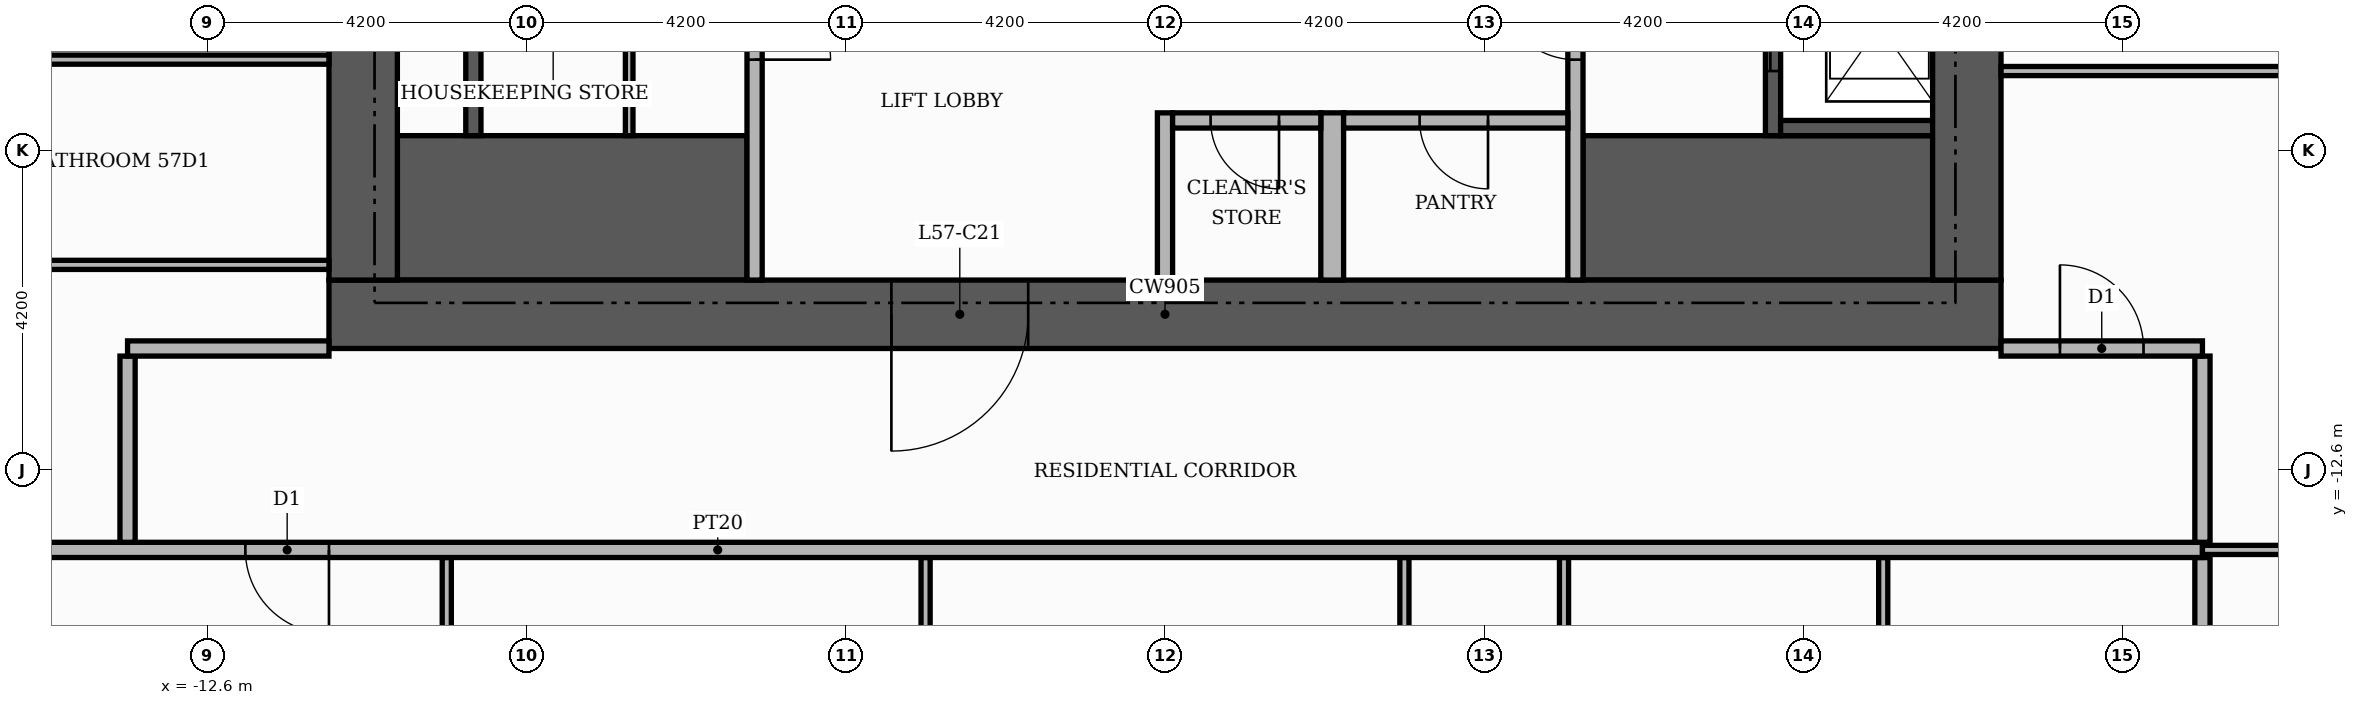
"""IFC4 building model, lengths in metres.
Left out: names, types, materials, properties, quantities, classifications, styles, units other than length and angle.
Written with IfcOpenShell. Run it as: python <this file> out.ifc"""

import sys

from ifc_helpers import new_model, si_unit, direction, frame, frame_2d, origin, place, context, subcontext, project, spatial, rectangle, extrude, element, fill, save


model = new_model("IFC4")
c1 = context("Model", 3, precision=1e-05, world=origin(), true_north=direction((0.0, 1.0)))
c2 = subcontext(c1, "Body", "Model", "MODEL_VIEW")
j1 = project(units=[si_unit("LENGTHUNIT", "METRE"), si_unit("PLANEANGLEUNIT", "RADIAN")], contexts=[c1])
p1 = place(None, origin())
s1 = spatial("IfcSite", under=j1, at=p1, CompositionType="ELEMENT")
p2 = place(p1, origin())
s2 = spatial("IfcBuilding", under=s1, at=p2, CompositionType="ELEMENT")
p3 = place(p2, frame((0.0, 0.0, 240.6)))
s3 = spatial("IfcBuildingStorey", under=s2, at=p3, CompositionType="ELEMENT", Elevation=240.6)
for number, where, z_axis, x_axis in (
    (1, (-10.1, -9.15, 0.0), (0.0, 0.0, 1.0), (1.0, 0.0, 0.0)),
    (2, (5.5, -9.15, 0.0), (0.0, 0.0, 1.0), (1.0, 0.0, 0.0)),
):
    element("IfcWall", number, at=place(p3, frame(where, z_axis=z_axis, x_axis=x_axis)), inside=s3, PredefinedType="SHEAR", context=c2, shape_type="SweptSolid", body=[
        extrude(rectangle(XDim=4.6, YDim=1.9, at=frame_2d((2.3, 0.0))), origin(), (0.0, 0.0, 1.0), 3.48),
    ])
p4 = place(p3, frame((-9.1, -8.2, 0.0), z_axis=(0.0, 0.0, 1.0), x_axis=(0.0, 1.0, 0.0)))
e3 = element("IfcWall", 3, at=p4, inside=s3, PredefinedType="SHEAR", context=c2, shape_type="SweptSolid", body=[
    extrude(rectangle(XDim=16.4, YDim=0.2, at=frame_2d((8.2, 0.0))), origin(), (0.0, 0.0, 1.0), 3.48),
])
p5 = place(p3, frame((8.0, -8.2, 0.0), z_axis=(0.0, 0.0, 1.0), x_axis=(0.0, 1.0, 0.0)))
e4 = element("IfcWall", 4, at=p5, inside=s3, PredefinedType="SHEAR", context=c2, shape_type="SweptSolid", body=[
    extrude(rectangle(XDim=16.4, YDim=0.2, at=frame_2d((8.2, 0.0))), origin(), (0.0, 0.0, 1.0), 3.48),
])
p6 = place(p5, frame((0.85, 0.0, 0.0)))
e5 = element("IfcOpeningElement", 5, at=p6, cuts=e4, PredefinedType="OPENING", context=c2, shape_type="SweptSolid", body=[
    extrude(rectangle(XDim=1.2, YDim=2.1, at=frame_2d((0.6, 1.05))), frame((0.0, 0.11, 0.0), z_axis=(0.0, -1.0, 0.0), x_axis=(1.0, 0.0, 0.0)), (0.0, 0.0, 1.0), 0.22),
])
p7 = place(p5, frame((3.55, 0.0, 0.0)))
e6 = element("IfcOpeningElement", 6, at=p7, cuts=e4, PredefinedType="OPENING", context=c2, shape_type="SweptSolid", body=[
    extrude(rectangle(XDim=1.2, YDim=2.1, at=frame_2d((0.6, 1.05))), frame((0.0, 0.11, 0.0), z_axis=(0.0, -1.0, 0.0), x_axis=(1.0, 0.0, 0.0)), (0.0, 0.0, 1.0), 0.22),
])
p8 = place(p5, frame((6.25, 0.0, 0.0)))
e7 = element("IfcOpeningElement", 7, at=p8, cuts=e4, PredefinedType="OPENING", context=c2, shape_type="SweptSolid", body=[
    extrude(rectangle(XDim=1.2, YDim=2.1, at=frame_2d((0.6, 1.05))), frame((0.0, 0.11, 0.0), z_axis=(0.0, -1.0, 0.0), x_axis=(1.0, 0.0, 0.0)), (0.0, 0.0, 1.0), 0.22),
])
p9 = place(p5, frame((8.95, 0.0, 0.0)))
e8 = element("IfcOpeningElement", 8, at=p9, cuts=e4, PredefinedType="OPENING", context=c2, shape_type="SweptSolid", body=[
    extrude(rectangle(XDim=1.2, YDim=2.1, at=frame_2d((0.6, 1.05))), frame((0.0, 0.11, 0.0), z_axis=(0.0, -1.0, 0.0), x_axis=(1.0, 0.0, 0.0)), (0.0, 0.0, 1.0), 0.22),
])
p10 = place(p5, frame((11.65, 0.0, 0.0)))
e9 = element("IfcOpeningElement", 9, at=p10, cuts=e4, PredefinedType="OPENING", context=c2, shape_type="SweptSolid", body=[
    extrude(rectangle(XDim=1.2, YDim=2.1, at=frame_2d((0.6, 1.05))), frame((0.0, 0.11, 0.0), z_axis=(0.0, -1.0, 0.0), x_axis=(1.0, 0.0, 0.0)), (0.0, 0.0, 1.0), 0.22),
])
p11 = place(p5, frame((14.35, 0.0, 0.0)))
e10 = element("IfcOpeningElement", 10, at=p11, cuts=e4, PredefinedType="OPENING", context=c2, shape_type="SweptSolid", body=[
    extrude(rectangle(XDim=1.2, YDim=2.1, at=frame_2d((0.6, 1.05))), frame((0.0, 0.11, 0.0), z_axis=(0.0, -1.0, 0.0), x_axis=(1.0, 0.0, 0.0)), (0.0, 0.0, 1.0), 0.22),
])
p12 = place(p3, frame((8.1, -8.1, 0.0), z_axis=(0.0, 0.0, 1.0), x_axis=(1.0, 0.0, 0.0)))
e11 = element("IfcWall", 11, at=p12, inside=s3, PredefinedType="SHEAR", context=c2, shape_type="SweptSolid", body=[
    extrude(rectangle(XDim=2.0, YDim=0.2, at=frame_2d((1.0, 0.0))), origin(), (0.0, 0.0, 1.0), 3.48),
])
p13 = place(p3, frame((-11.0, -10.55, 0.0), z_axis=(0.0, 0.0, 1.0), x_axis=(1.0, 0.0, 0.0)))
e12 = element("IfcWall", 12, at=p13, inside=s3, PredefinedType="SHEAR", context=c2, shape_type="SweptSolid", body=[
    extrude(rectangle(XDim=22.0, YDim=0.9, at=frame_2d((11.0, 0.0))), origin(), (0.0, 0.0, 1.0), 3.48),
])
p14 = place(p13, frame((7.4, 0.0, 0.0)))
e13 = element("IfcOpeningElement", 13, at=p14, cuts=e12, PredefinedType="OPENING", context=c2, shape_type="SweptSolid", body=[
    extrude(rectangle(XDim=1.8, YDim=2.2, at=frame_2d((0.9, 1.1))), frame((0.0, 0.46, 0.0), z_axis=(0.0, -1.0, 0.0), x_axis=(1.0, 0.0, 0.0)), (0.0, 0.0, 1.0), 0.92),
])
for number, where, z_axis, x_axis in (
    (14, (-10.55, -10.1, 0.0), (0.0, 0.0, 1.0), (0.0, 1.0, 0.0)),
    (15, (10.55, -10.1, 0.0), (0.0, 0.0, 1.0), (0.0, 1.0, 0.0)),
):
    element("IfcWall", number, at=place(p3, frame(where, z_axis=z_axis, x_axis=x_axis)), inside=s3, PredefinedType="SHEAR", context=c2, shape_type="SweptSolid", body=[
        extrude(rectangle(XDim=20.2, YDim=0.9, at=frame_2d((10.1, 0.0))), origin(), (0.0, 0.0, 1.0), 3.48),
    ])
p15 = place(p3, frame((-5.4, -10.1, 0.0), z_axis=(0.0, 0.0, 1.0), x_axis=(0.0, 1.0, 0.0)))
e16 = element("IfcWall", 16, at=p15, inside=s3, PredefinedType="PARTITIONING", context=c2, shape_type="SweptSolid", body=[
    extrude(rectangle(XDim=4.6, YDim=0.2, at=frame_2d((2.3, 0.0))), origin(), (0.0, 0.0, 1.0), 3.48),
])
p16 = place(p15, frame((2.9, 0.0, 0.0)))
e17 = element("IfcOpeningElement", 17, at=p16, cuts=e16, PredefinedType="OPENING", context=c2, shape_type="SweptSolid", body=[
    extrude(rectangle(XDim=1.0, YDim=2.1, at=frame_2d((0.5, 1.05))), frame((0.0, 0.11, 0.0), z_axis=(0.0, -1.0, 0.0), x_axis=(1.0, 0.0, 0.0)), (0.0, 0.0, 1.0), 0.22),
])
p17 = place(p3, frame((0.0, -10.1, 0.0), z_axis=(0.0, 0.0, 1.0), x_axis=(0.0, 1.0, 0.0)))
e18 = element("IfcWall", 18, at=p17, inside=s3, PredefinedType="PARTITIONING", context=c2, shape_type="SweptSolid", body=[
    extrude(rectangle(XDim=2.2, YDim=0.2, at=frame_2d((1.1, 0.0))), origin(), (0.0, 0.0, 1.0), 3.48),
])
p18 = place(p3, frame((2.2, -10.1, 0.0), z_axis=(0.0, 0.0, 1.0), x_axis=(0.0, 1.0, 0.0)))
e19 = element("IfcWall", 19, at=p18, inside=s3, PredefinedType="PARTITIONING", context=c2, shape_type="SweptSolid", body=[
    extrude(rectangle(XDim=2.2, YDim=0.3, at=frame_2d((1.1, 0.0))), origin(), (0.0, 0.0, 1.0), 3.48),
])
p19 = place(p3, frame((5.4, -10.1, 0.0), z_axis=(0.0, 0.0, 1.0), x_axis=(0.0, 1.0, 0.0)))
e20 = element("IfcWall", 20, at=p19, inside=s3, PredefinedType="PARTITIONING", context=c2, shape_type="SweptSolid", body=[
    extrude(rectangle(XDim=4.6, YDim=0.2, at=frame_2d((2.3, 0.0))), origin(), (0.0, 0.0, 1.0), 3.48),
])
p20 = place(p19, frame((2.9, 0.0, 0.0)))
e21 = element("IfcOpeningElement", 21, at=p20, cuts=e20, PredefinedType="OPENING", context=c2, shape_type="SweptSolid", body=[
    extrude(rectangle(XDim=1.0, YDim=2.1, at=frame_2d((0.5, 1.05))), frame((0.0, 0.11, 0.0), z_axis=(0.0, -1.0, 0.0), x_axis=(1.0, 0.0, 0.0)), (0.0, 0.0, 1.0), 0.22),
])
p21 = place(p3, frame((-7.05, -8.2, 0.0), z_axis=(0.0, 0.0, 1.0), x_axis=(0.0, 1.0, 0.0)))
e22 = element("IfcWall", 22, at=p21, inside=s3, PredefinedType="PARTITIONING", context=c2, shape_type="SweptSolid", body=[
    extrude(rectangle(XDim=16.4, YDim=0.1, at=frame_2d((8.2, 0.0))), origin(), (0.0, 0.0, 1.0), 3.48),
])
p22 = place(p21, frame((1.15, 0.0, 0.0)))
e23 = element("IfcOpeningElement", 23, at=p22, cuts=e22, PredefinedType="OPENING", context=c2, shape_type="SweptSolid", body=[
    extrude(rectangle(XDim=0.9, YDim=2.1, at=frame_2d((0.45, 1.05))), frame((0.0, 0.06, 0.0), z_axis=(0.0, -1.0, 0.0), x_axis=(1.0, 0.0, 0.0)), (0.0, 0.0, 1.0), 0.12),
])
p23 = place(p21, frame((4.3, 0.0, 0.0)))
e24 = element("IfcOpeningElement", 24, at=p23, cuts=e22, PredefinedType="OPENING", context=c2, shape_type="SweptSolid", body=[
    extrude(rectangle(XDim=1.0, YDim=2.1, at=frame_2d((0.5, 1.05))), frame((0.0, 0.06, 0.0), z_axis=(0.0, -1.0, 0.0), x_axis=(1.0, 0.0, 0.0)), (0.0, 0.0, 1.0), 0.12),
])
p24 = place(p21, frame((7.65, 0.0, 0.0)))
e25 = element("IfcOpeningElement", 25, at=p24, cuts=e22, PredefinedType="OPENING", context=c2, shape_type="SweptSolid", body=[
    extrude(rectangle(XDim=0.9, YDim=2.1, at=frame_2d((0.45, 1.05))), frame((0.0, 0.06, 0.0), z_axis=(0.0, -1.0, 0.0), x_axis=(1.0, 0.0, 0.0)), (0.0, 0.0, 1.0), 0.12),
])
p25 = place(p21, frame((10.95, 0.0, 0.0)))
e26 = element("IfcOpeningElement", 26, at=p25, cuts=e22, PredefinedType="OPENING", context=c2, shape_type="SweptSolid", body=[
    extrude(rectangle(XDim=0.9, YDim=2.1, at=frame_2d((0.45, 1.05))), frame((0.0, 0.06, 0.0), z_axis=(0.0, -1.0, 0.0), x_axis=(1.0, 0.0, 0.0)), (0.0, 0.0, 1.0), 0.12),
])
p26 = place(p21, frame((14.25, 0.0, 0.0)))
e27 = element("IfcOpeningElement", 27, at=p26, cuts=e22, PredefinedType="OPENING", context=c2, shape_type="SweptSolid", body=[
    extrude(rectangle(XDim=0.9, YDim=2.1, at=frame_2d((0.45, 1.05))), frame((0.0, 0.06, 0.0), z_axis=(0.0, -1.0, 0.0), x_axis=(1.0, 0.0, 0.0)), (0.0, 0.0, 1.0), 0.12),
])
p27 = place(p3, frame((0.1, -8.0, 0.0), z_axis=(0.0, 0.0, 1.0), x_axis=(1.0, 0.0, 0.0)))
e28 = element("IfcWall", 28, at=p27, inside=s3, PredefinedType="PARTITIONING", context=c2, shape_type="SweptSolid", body=[
    extrude(rectangle(XDim=1.95, YDim=0.2, at=frame_2d((0.975, 0.0))), origin(), (0.0, 0.0, 1.0), 3.48),
])
p28 = place(p27, frame((0.5, 0.0, 0.0)))
e29 = element("IfcOpeningElement", 29, at=p28, cuts=e28, PredefinedType="OPENING", context=c2, shape_type="SweptSolid", body=[
    extrude(rectangle(XDim=0.9, YDim=2.1, at=frame_2d((0.45, 1.05))), frame((0.0, 0.11, 0.0), z_axis=(0.0, -1.0, 0.0), x_axis=(1.0, 0.0, 0.0)), (0.0, 0.0, 1.0), 0.22),
])
p29 = place(p3, frame((2.35, -8.0, 0.0), z_axis=(0.0, 0.0, 1.0), x_axis=(1.0, 0.0, 0.0)))
e30 = element("IfcWall", 30, at=p29, inside=s3, PredefinedType="PARTITIONING", context=c2, shape_type="SweptSolid", body=[
    extrude(rectangle(XDim=2.95, YDim=0.2, at=frame_2d((1.475, 0.0))), origin(), (0.0, 0.0, 1.0), 3.48),
])
p30 = place(p29, frame((1.0, 0.0, 0.0)))
e31 = element("IfcOpeningElement", 31, at=p30, cuts=e30, PredefinedType="OPENING", context=c2, shape_type="SweptSolid", body=[
    extrude(rectangle(XDim=0.9, YDim=2.1, at=frame_2d((0.45, 1.05))), frame((0.0, 0.11, 0.0), z_axis=(0.0, -1.0, 0.0), x_axis=(1.0, 0.0, 0.0)), (0.0, 0.0, 1.0), 0.22),
])
p31 = place(p3, frame((13.65, -25.42, 0.0), z_axis=(0.0, 0.0, 1.0), x_axis=(0.0, 1.0, 0.0)))
e32 = element("IfcWall", 32, at=p31, inside=s3, PredefinedType="PARTITIONING", context=c2, shape_type="SweptSolid", body=[
    extrude(rectangle(XDim=11.67, YDim=0.2, at=frame_2d((5.835, 0.0))), origin(), (0.0, 0.0, 1.0), 3.48),
])
for number, where, z_axis, x_axis in (
    (33, (-9.45, -18.56, 0.0), (0.0, 0.0, 1.0), (0.0, 1.0, 0.0)),
    (34, (-3.15, -18.56, 0.0), (0.0, 0.0, 1.0), (0.0, 1.0, 0.0)),
    (35, (3.15, -18.56, 0.0), (0.0, 0.0, 1.0), (0.0, 1.0, 0.0)),
    (36, (5.25, -18.56, 0.0), (0.0, 0.0, 1.0), (0.0, 1.0, 0.0)),
    (37, (9.45, -18.56, 0.0), (0.0, 0.0, 1.0), (0.0, 1.0, 0.0)),
):
    element("IfcWall", number, at=place(p3, frame(where, z_axis=z_axis, x_axis=x_axis)), inside=s3, PredefinedType="PARTITIONING", context=c2, shape_type="SweptSolid", body=[
        extrude(rectangle(XDim=4.81, YDim=0.12, at=frame_2d((2.405, 0.0))), origin(), (0.0, 0.0, 1.0), 3.48),
    ])
p32 = place(p3, frame((-25.42, -13.65, 0.0), z_axis=(0.0, 0.0, 1.0), x_axis=(1.0, 0.0, 0.0)))
e38 = element("IfcWall", 38, at=p32, inside=s3, PredefinedType="PARTITIONING", context=c2, shape_type="SweptSolid", body=[
    extrude(rectangle(XDim=39.07, YDim=0.2, at=frame_2d((19.535, 0.0))), origin(), (0.0, 0.0, 1.0), 3.48),
])
p33 = place(p32, frame((13.32, 0.0, 0.0)))
e39 = element("IfcOpeningElement", 39, at=p33, cuts=e38, PredefinedType="OPENING", context=c2, shape_type="SweptSolid", body=[
    extrude(rectangle(XDim=1.1, YDim=2.4, at=frame_2d((0.55, 1.2))), frame((0.0, 0.11, 0.0), z_axis=(0.0, -1.0, 0.0), x_axis=(1.0, 0.0, 0.0)), (0.0, 0.0, 1.0), 0.22),
])
p34 = place(p3, frame((13.65, -13.65, 0.0), z_axis=(0.0, 0.0, 1.0), x_axis=(1.0, 0.0, 0.0)))
e40 = element("IfcWall", 40, at=p34, inside=s3, PredefinedType="PARTITIONING", context=c2, shape_type="SweptSolid", body=[
    extrude(rectangle(XDim=7.07, YDim=0.12, at=frame_2d((3.535, 0.0))), origin(), (0.0, 0.0, 1.0), 3.48),
])
p35 = place(p34, frame((3.085, 0.0, 0.0)))
e41 = element("IfcOpeningElement", 41, at=p35, cuts=e40, PredefinedType="OPENING", context=c2, shape_type="SweptSolid", body=[
    extrude(rectangle(XDim=0.9, YDim=2.1, at=frame_2d((0.45, 1.05))), frame((0.0, 0.07, 0.0), z_axis=(0.0, -1.0, 0.0), x_axis=(1.0, 0.0, 0.0)), (0.0, 0.0, 1.0), 0.14),
])
for number, where, z_axis, x_axis in (
    (42, (-13.65, -13.55, 0.0), (0.0, 0.0, 1.0), (0.0, 1.0, 0.0)),
    (43, (13.65, -13.55, 0.0), (0.0, 0.0, 1.0), (0.0, 1.0, 0.0)),
):
    element("IfcWall", number, at=place(p3, frame(where, z_axis=z_axis, x_axis=x_axis)), inside=s3, PredefinedType="PARTITIONING", context=c2, shape_type="SweptSolid", body=[
        extrude(rectangle(XDim=2.45, YDim=0.2, at=frame_2d((1.225, 0.0))), origin(), (0.0, 0.0, 1.0), 3.48),
    ])
p36 = place(p3, frame((-13.65, -11.0, 0.0), z_axis=(0.0, 0.0, 1.0), x_axis=(1.0, 0.0, 0.0)))
e44 = element("IfcWall", 44, at=p36, inside=s3, PredefinedType="PARTITIONING", context=c2, shape_type="SweptSolid", body=[
    extrude(rectangle(XDim=2.65, YDim=0.2, at=frame_2d((1.325, 0.0))), origin(), (0.0, 0.0, 1.0), 3.48),
])
p37 = place(p3, frame((11.0, -11.0, 0.0), z_axis=(0.0, 0.0, 1.0), x_axis=(1.0, 0.0, 0.0)))
e45 = element("IfcWall", 45, at=p37, inside=s3, PredefinedType="PARTITIONING", context=c2, shape_type="SweptSolid", body=[
    extrude(rectangle(XDim=2.65, YDim=0.2, at=frame_2d((1.325, 0.0))), origin(), (0.0, 0.0, 1.0), 3.48),
])
p38 = place(p37, frame((0.775, 0.0, 0.0)))
e46 = element("IfcOpeningElement", 46, at=p38, cuts=e45, PredefinedType="OPENING", context=c2, shape_type="SweptSolid", body=[
    extrude(rectangle(XDim=1.1, YDim=2.4, at=frame_2d((0.55, 1.2))), frame((0.0, 0.11, 0.0), z_axis=(0.0, -1.0, 0.0), x_axis=(1.0, 0.0, 0.0)), (0.0, 0.0, 1.0), 0.22),
])
p39 = place(p3, frame((-18.32, -9.9, 0.0), z_axis=(0.0, 0.0, 1.0), x_axis=(1.0, 0.0, 0.0)))
e47 = element("IfcWall", 47, at=p39, inside=s3, PredefinedType="PARTITIONING", context=c2, shape_type="SweptSolid", body=[
    extrude(rectangle(XDim=7.32, YDim=0.12, at=frame_2d((3.66, 0.0))), origin(), (0.0, 0.0, 1.0), 3.48),
])
p40 = place(p3, frame((11.0, -7.35, 0.0), z_axis=(0.0, 0.0, 1.0), x_axis=(1.0, 0.0, 0.0)))
e48 = element("IfcWall", 48, at=p40, inside=s3, PredefinedType="PARTITIONING", context=c2, shape_type="SweptSolid", body=[
    extrude(rectangle(XDim=8.22, YDim=0.12, at=frame_2d((4.11, 0.0))), origin(), (0.0, 0.0, 1.0), 3.48),
])
p41 = place(p40, frame((3.66, 0.0, 0.0)))
e49 = element("IfcOpeningElement", 49, at=p41, cuts=e48, PredefinedType="OPENING", context=c2, shape_type="SweptSolid", body=[
    extrude(rectangle(XDim=0.9, YDim=2.1, at=frame_2d((0.45, 1.05))), frame((0.0, 0.07, 0.0), z_axis=(0.0, -1.0, 0.0), x_axis=(1.0, 0.0, 0.0)), (0.0, 0.0, 1.0), 0.14),
])
p42 = place(p3, frame((-18.32, -7.2, 0.0), z_axis=(0.0, 0.0, 1.0), x_axis=(1.0, 0.0, 0.0)))
e50 = element("IfcWall", 50, at=p42, inside=s3, PredefinedType="PARTITIONING", context=c2, shape_type="SweptSolid", body=[
    extrude(rectangle(XDim=7.32, YDim=0.12, at=frame_2d((3.66, 0.0))), origin(), (0.0, 0.0, 1.0), 3.48),
])
p43 = place(p6, origin())
e51 = element("IfcDoor", 51, at=p43, inside=s3, OperationType="SLIDING_TO_LEFT", PredefinedType="DOOR", context=c2, shape_type="SweptSolid", body=[
    extrude(rectangle(XDim=1.2, YDim=2.1, at=frame_2d((0.6, 1.05))), frame((0.0, 0.025, 0.0), z_axis=(0.0, -1.0, 0.0), x_axis=(1.0, 0.0, 0.0)), (0.0, 0.0, 1.0), 0.05),
])
fill(e5, e51)
p44 = place(p16, frame((1.0, 0.0, 0.0), z_axis=(0.0, 0.0, 1.0), x_axis=(-1.0, 0.0, 0.0)))
e52 = element("IfcDoor", 52, at=p44, inside=s3, OperationType="SINGLE_SWING_LEFT", PredefinedType="DOOR", context=c2, shape_type="SweptSolid", body=[
    extrude(rectangle(XDim=1.0, YDim=2.1, at=frame_2d((0.5, 1.05))), frame((0.0, 0.025, 0.0), z_axis=(0.0, -1.0, 0.0), x_axis=(1.0, 0.0, 0.0)), (0.0, 0.0, 1.0), 0.05),
])
fill(e17, e52)
p45 = place(p20, origin())
e53 = element("IfcDoor", 53, at=p45, inside=s3, OperationType="SINGLE_SWING_RIGHT", PredefinedType="DOOR", context=c2, shape_type="SweptSolid", body=[
    extrude(rectangle(XDim=1.0, YDim=2.1, at=frame_2d((0.5, 1.05))), frame((0.0, 0.025, 0.0), z_axis=(0.0, -1.0, 0.0), x_axis=(1.0, 0.0, 0.0)), (0.0, 0.0, 1.0), 0.05),
])
fill(e21, e53)
p46 = place(p14, frame((1.8, 0.0, 0.0), z_axis=(0.0, 0.0, 1.0), x_axis=(-1.0, 0.0, 0.0)))
e54 = element("IfcDoor", 54, at=p46, inside=s3, OperationType="DOUBLE_DOOR_SINGLE_SWING", PredefinedType="DOOR", context=c2, shape_type="SweptSolid", body=[
    extrude(rectangle(XDim=1.8, YDim=2.2, at=frame_2d((0.9, 1.1))), frame((0.0, 0.025, 0.0), z_axis=(0.0, -1.0, 0.0), x_axis=(1.0, 0.0, 0.0)), (0.0, 0.0, 1.0), 0.05),
])
fill(e13, e54)
p47 = place(p28, frame((0.9, 0.0, 0.0), z_axis=(0.0, 0.0, 1.0), x_axis=(-1.0, 0.0, 0.0)))
e55 = element("IfcDoor", 55, at=p47, inside=s3, OperationType="SINGLE_SWING_RIGHT", PredefinedType="DOOR", context=c2, shape_type="SweptSolid", body=[
    extrude(rectangle(XDim=0.9, YDim=2.1, at=frame_2d((0.45, 1.05))), frame((0.0, 0.025, 0.0), z_axis=(0.0, -1.0, 0.0), x_axis=(1.0, 0.0, 0.0)), (0.0, 0.0, 1.0), 0.05),
])
fill(e29, e55)
p48 = place(p30, frame((0.9, 0.0, 0.0), z_axis=(0.0, 0.0, 1.0), x_axis=(-1.0, 0.0, 0.0)))
e56 = element("IfcDoor", 56, at=p48, inside=s3, OperationType="SINGLE_SWING_RIGHT", PredefinedType="DOOR", context=c2, shape_type="SweptSolid", body=[
    extrude(rectangle(XDim=0.9, YDim=2.1, at=frame_2d((0.45, 1.05))), frame((0.0, 0.025, 0.0), z_axis=(0.0, -1.0, 0.0), x_axis=(1.0, 0.0, 0.0)), (0.0, 0.0, 1.0), 0.05),
])
fill(e31, e56)
p49 = place(p33, frame((1.1, 0.0, 0.0), z_axis=(0.0, 0.0, 1.0), x_axis=(-1.0, 0.0, 0.0)))
e57 = element("IfcDoor", 57, at=p49, inside=s3, OperationType="SINGLE_SWING_RIGHT", PredefinedType="DOOR", context=c2, shape_type="SweptSolid", body=[
    extrude(rectangle(XDim=1.1, YDim=2.4, at=frame_2d((0.55, 1.2))), frame((0.0, 0.025, 0.0), z_axis=(0.0, -1.0, 0.0), x_axis=(1.0, 0.0, 0.0)), (0.0, 0.0, 1.0), 0.05),
])
fill(e39, e57)
p50 = place(p38, origin())
e58 = element("IfcDoor", 58, at=p50, inside=s3, OperationType="SINGLE_SWING_LEFT", PredefinedType="DOOR", context=c2, shape_type="SweptSolid", body=[
    extrude(rectangle(XDim=1.1, YDim=2.4, at=frame_2d((0.55, 1.2))), frame((0.0, 0.025, 0.0), z_axis=(0.0, -1.0, 0.0), x_axis=(1.0, 0.0, 0.0)), (0.0, 0.0, 1.0), 0.05),
])
fill(e46, e58)
save(model, sys.argv[1])
